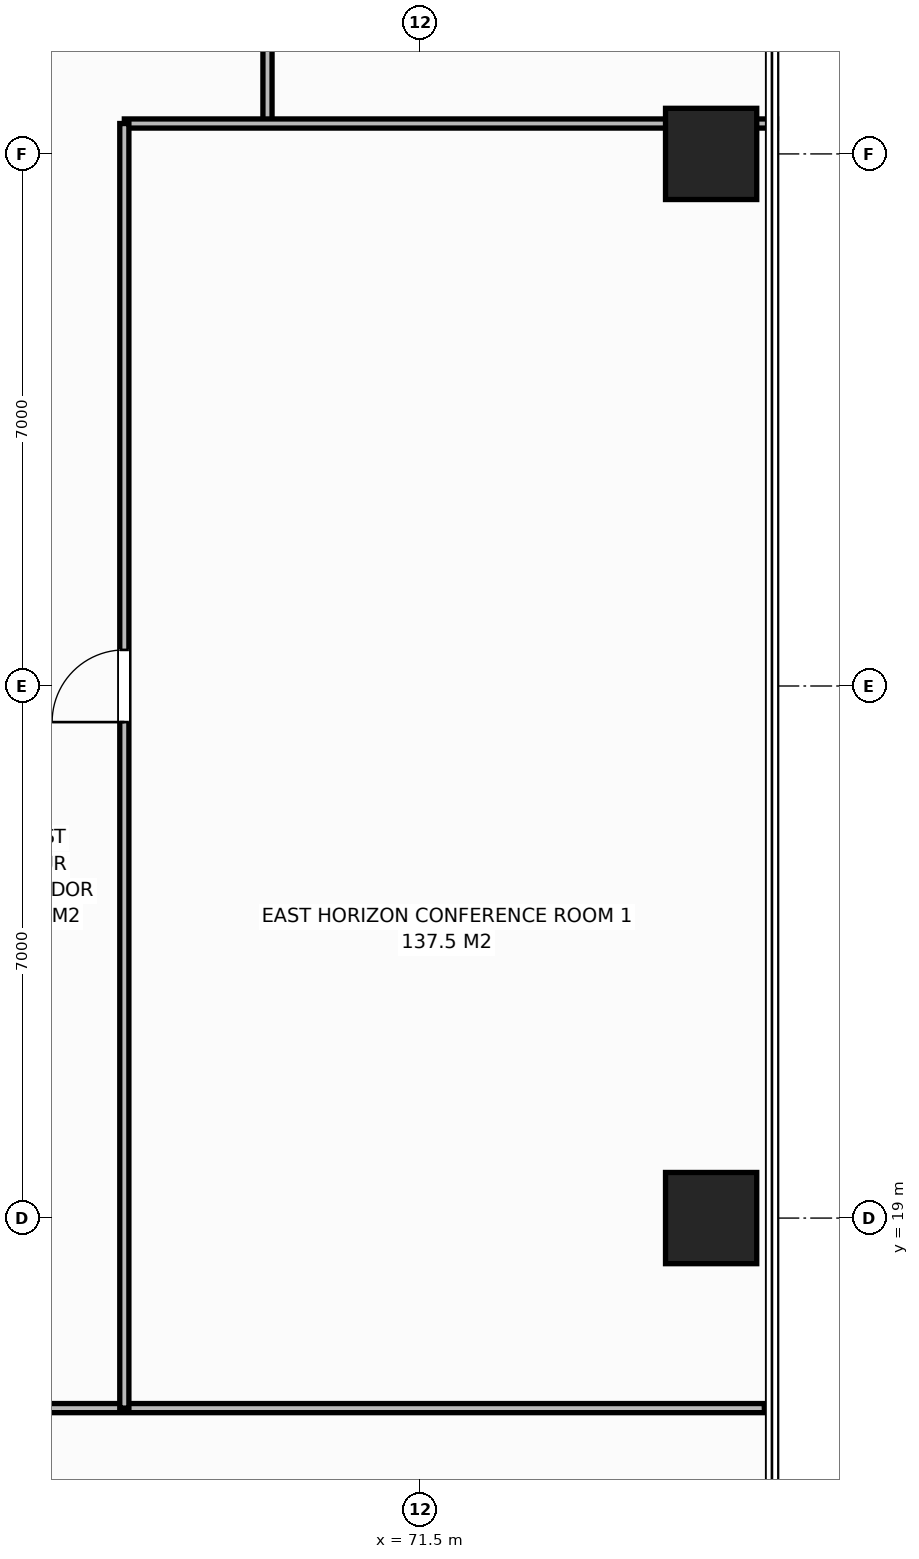
"""IFC4 building model, lengths in metres.
Left out: names, types, materials, properties, quantities, classifications, styles, units other than length and angle.
Written with IfcOpenShell. Run it as: python <this file> out.ifc"""

import sys

from ifc_helpers import new_model, si_unit, direction, frame, frame_2d, origin, origin_2d, place, context, subcontext, project, spatial, rectangle, extrude, element, fill, save


model = new_model("IFC4")
c1 = context("Model", 3, precision=1e-05, world=origin(), true_north=direction((0.0, 1.0)))
c2 = subcontext(c1, "Body", "Model", "MODEL_VIEW")
j1 = project(units=[si_unit("LENGTHUNIT", "METRE"), si_unit("PLANEANGLEUNIT", "RADIAN")], contexts=[c1])
p1 = place(None, origin())
s1 = spatial("IfcSite", under=j1, at=p1, CompositionType="ELEMENT")
p2 = place(p1, origin())
s2 = spatial("IfcBuilding", under=s1, at=p2, CompositionType="ELEMENT")
p3 = place(p2, frame((0.0, 0.0, 108.8)))
s3 = spatial("IfcBuildingStorey", under=s2, at=p3, CompositionType="ELEMENT", Elevation=108.8)
for number, where, z_axis, x_axis in (
    (1, (75.32, 19.0, 0.0), (0.0, 0.0, 1.0), (1.0, 0.0, 0.0)),
    (2, (75.32, 33.0, 0.0), (0.0, 0.0, 1.0), (1.0, 0.0, 0.0)),
):
    element("IfcColumn", number, at=place(p3, frame(where, z_axis=z_axis, x_axis=x_axis)), inside=s3, PredefinedType="COLUMN", context=c2, shape_type="SweptSolid", body=[
        extrude(rectangle(XDim=1.2, YDim=1.2, at=origin_2d()), origin(), (0.0, 0.0, 1.0), 3.8),
    ])
p4 = place(p3, frame((69.483, 33.4, 0.0), z_axis=(0.0, 0.0, 1.0), x_axis=(0.0, 1.0, 0.0)))
e3 = element("IfcWall", 3, at=p4, inside=s3, PredefinedType="PARTITIONING", context=c2, shape_type="SweptSolid", body=[
    extrude(rectangle(XDim=2.1, YDim=0.12, at=frame_2d((1.05, 0.0))), origin(), (0.0, 0.0, 1.0), 3.565),
])
p5 = place(p3, frame((60.606, 16.5, 0.0), z_axis=(0.0, 0.0, 1.0), x_axis=(1.0, 0.0, 0.0)))
e4 = element("IfcWall", 4, at=p5, inside=s3, PredefinedType="PARTITIONING", context=c2, shape_type="SweptSolid", body=[
    extrude(rectangle(XDim=15.414, YDim=0.12, at=frame_2d((7.707, 0.0))), origin(), (0.0, 0.0, 1.0), 3.565),
])
p6 = place(p5, frame((0.48, 0.0, 0.0)))
e5 = element("IfcOpeningElement", 5, at=p6, cuts=e4, PredefinedType="OPENING", context=c2, shape_type="SweptSolid", body=[
    extrude(rectangle(XDim=0.95, YDim=2.15, at=frame_2d((0.475, 1.075))), frame((0.0, 0.07, 0.0), z_axis=(0.0, -1.0, 0.0), x_axis=(1.0, 0.0, 0.0)), (0.0, 0.0, 1.0), 0.14),
])
p7 = place(p3, frame((67.6, 33.4, 0.0), z_axis=(0.0, 0.0, 1.0), x_axis=(1.0, 0.0, 0.0)))
e6 = element("IfcWall", 6, at=p7, inside=s3, PredefinedType="PARTITIONING", context=c2, shape_type="SweptSolid", body=[
    extrude(rectangle(XDim=8.58, YDim=0.12, at=frame_2d((4.29, 0.0))), origin(), (0.0, 0.0, 1.0), 3.565),
])
p8 = place(p3, frame((67.6, 16.5, 0.0), z_axis=(0.0, 0.0, 1.0), x_axis=(0.0, 1.0, 0.0)))
e7 = element("IfcWall", 7, at=p8, inside=s3, PredefinedType="PARTITIONING", context=c2, shape_type="SweptSolid", body=[
    extrude(rectangle(XDim=16.9, YDim=0.12, at=frame_2d((8.45, 0.0))), origin(), (0.0, 0.0, 1.0), 3.565),
])
p9 = place(p8, frame((9.025, 0.0, 0.0)))
e8 = element("IfcOpeningElement", 8, at=p9, cuts=e7, PredefinedType="OPENING", context=c2, shape_type="SweptSolid", body=[
    extrude(rectangle(XDim=0.95, YDim=2.15, at=frame_2d((0.475, 1.075))), frame((0.0, 0.07, 0.0), z_axis=(0.0, -1.0, 0.0), x_axis=(1.0, 0.0, 0.0)), (0.0, 0.0, 1.0), 0.14),
])
p10 = place(p9, origin())
e9 = element("IfcDoor", 9, at=p10, inside=s3, OperationType="SINGLE_SWING_LEFT", PredefinedType="DOOR", context=c2, shape_type="SweptSolid", body=[
    extrude(rectangle(XDim=0.95, YDim=2.15, at=frame_2d((0.475, 1.075))), frame((0.0, 0.025, 0.0), z_axis=(0.0, -1.0, 0.0), x_axis=(1.0, 0.0, 0.0)), (0.0, 0.0, 1.0), 0.05),
])
fill(e8, e9)
save(model, sys.argv[1])
